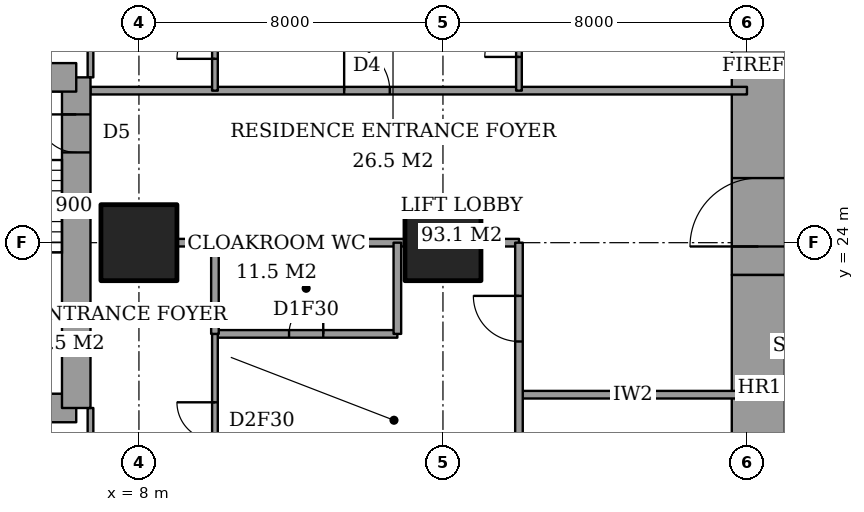
"""IFC4 building model, lengths in metres.
Left out: names, types, materials, properties, quantities, classifications, styles, units other than length and angle.
Written with IfcOpenShell. Run it as: python <this file> out.ifc"""

import sys

from ifc_helpers import new_model, si_unit, direction, frame, frame_2d, origin, origin_2d, place, context, subcontext, project, spatial, rectangle, extrude, element, fill, save


model = new_model("IFC4")
c1 = context("Model", 3, precision=1e-05, world=origin(), true_north=direction((0.0, 1.0)))
c2 = subcontext(c1, "Body", "Model", "MODEL_VIEW")
j1 = project(units=[si_unit("LENGTHUNIT", "METRE"), si_unit("PLANEANGLEUNIT", "RADIAN")], contexts=[c1])
p1 = place(None, origin())
s1 = spatial("IfcSite", under=j1, at=p1, CompositionType="ELEMENT")
p2 = place(p1, origin())
s2 = spatial("IfcBuilding", under=s1, at=p2, CompositionType="ELEMENT")
p3 = place(p2, frame((0.0, 0.0, 135.8)))
s3 = spatial("IfcBuildingStorey", under=s2, at=p3, CompositionType="ELEMENT", Elevation=135.8)
for number, where, z_axis, x_axis in (
    (1, (8.0, 24.0, 0.0), (0.0, 0.0, 1.0), (1.0, 0.0, 0.0)),
    (2, (16.0, 24.0, 0.0), (0.0, 0.0, 1.0), (1.0, 0.0, 0.0)),
):
    element("IfcColumn", number, at=place(p3, frame(where, z_axis=z_axis, x_axis=x_axis)), inside=s3, PredefinedType="COLUMN", context=c2, shape_type="SweptSolid", body=[
        extrude(rectangle(XDim=2.0, YDim=2.0, at=origin_2d()), origin(), (0.0, 0.0, 1.0), 3.6),
    ])
p4 = place(p3, frame((24.3, 13.0, 0.0), z_axis=(0.0, 0.0, 1.0), x_axis=(0.0, 1.0, 0.0)))
e3 = element("IfcWall", 3, at=p4, inside=s3, PredefinedType="SHEAR", context=c2, shape_type="SweptSolid", body=[
    extrude(rectangle(XDim=10.15, YDim=1.4, at=frame_2d((5.075, 0.0))), origin(), (0.0, 0.0, 1.0), 3.6),
])
p5 = place(p3, frame((24.3, 23.15, 0.0), z_axis=(0.0, 0.0, 1.0), x_axis=(0.0, 1.0, 0.0)))
e4 = element("IfcWall", 4, at=p5, inside=s3, PredefinedType="SHEAR", context=c2, shape_type="SweptSolid", body=[
    extrude(rectangle(XDim=11.85, YDim=1.4, at=frame_2d((5.925, 0.0))), origin(), (0.0, 0.0, 1.0), 3.6),
])
p6 = place(p5, frame((0.75, 0.0, 0.0)))
e5 = element("IfcOpeningElement", 5, at=p6, cuts=e4, PredefinedType="OPENING", context=c2, shape_type="SweptSolid", body=[
    extrude(rectangle(XDim=1.8, YDim=2.4, at=frame_2d((0.9, 1.2))), frame((0.0, 0.71, 0.0), z_axis=(0.0, -1.0, 0.0), x_axis=(1.0, 0.0, 0.0)), (0.0, 0.0, 1.0), 1.42),
])
p7 = place(p3, frame((1.9, 19.65, 0.0), z_axis=(0.0, 0.0, 1.0), x_axis=(1.0, 0.0, 0.0)))
e6 = element("IfcWall", 6, at=p7, inside=s3, PredefinedType="SHEAR", context=c2, shape_type="SweptSolid", body=[
    extrude(rectangle(XDim=4.45, YDim=0.75, at=frame_2d((2.225, 0.0))), origin(), (0.0, 0.0, 1.0), 3.6),
])
p8 = place(p3, frame((6.35, 19.65, 0.0), z_axis=(0.0, 0.0, 1.0), x_axis=(0.0, 1.0, 0.0)))
e7 = element("IfcWall", 7, at=p8, inside=s3, PredefinedType="SHEAR", context=c2, shape_type="SweptSolid", body=[
    extrude(rectangle(XDim=8.7, YDim=0.75, at=frame_2d((4.35, 0.0))), origin(), (0.0, 0.0, 1.0), 3.6),
])
p9 = place(p8, frame((6.725, 0.0, 0.0)))
e8 = element("IfcOpeningElement", 8, at=p9, cuts=e7, PredefinedType="OPENING", context=c2, shape_type="SweptSolid", body=[
    extrude(rectangle(XDim=1.0, YDim=2.1, at=frame_2d((0.5, 1.05))), frame((0.0, 0.385, 0.0), z_axis=(0.0, -1.0, 0.0), x_axis=(1.0, 0.0, 0.0)), (0.0, 0.0, 1.0), 0.77),
])
p10 = place(p3, frame((6.35, 28.35, 0.0), z_axis=(0.0, 0.0, 1.0), x_axis=(-1.0, 0.0, 0.0)))
e9 = element("IfcWall", 9, at=p10, inside=s3, PredefinedType="SHEAR", context=c2, shape_type="SweptSolid", body=[
    extrude(rectangle(XDim=4.45, YDim=0.75, at=frame_2d((2.225, 0.0))), origin(), (0.0, 0.0, 1.0), 3.6),
])
p11 = place(p3, frame((18.0, 20.0, 0.0), z_axis=(0.0, 0.0, 1.0), x_axis=(1.0, 0.0, 0.0)))
e10 = element("IfcWall", 10, at=p11, inside=s3, PredefinedType="PARTITIONING", context=c2, shape_type="SweptSolid", body=[
    extrude(rectangle(XDim=6.0, YDim=0.2, at=frame_2d((3.0, 0.0))), origin(), (0.0, 0.0, 1.0), 3.35),
])
p12 = place(p3, frame((10.0, 21.6, 0.0), z_axis=(0.0, 0.0, 1.0), x_axis=(1.0, 0.0, 0.0)))
e11 = element("IfcWall", 11, at=p12, inside=s3, PredefinedType="PARTITIONING", context=c2, shape_type="SweptSolid", body=[
    extrude(rectangle(XDim=4.8, YDim=0.2, at=frame_2d((2.4, 0.0))), origin(), (0.0, 0.0, 1.0), 3.35),
])
p13 = place(p12, frame((1.95, 0.0, 0.0)))
e12 = element("IfcOpeningElement", 12, at=p13, cuts=e11, PredefinedType="OPENING", context=c2, shape_type="SweptSolid", body=[
    extrude(rectangle(XDim=0.9, YDim=2.1, at=frame_2d((0.45, 1.05))), frame((0.0, 0.11, 0.0), z_axis=(0.0, -1.0, 0.0), x_axis=(1.0, 0.0, 0.0)), (0.0, 0.0, 1.0), 0.22),
])
p14 = place(p3, frame((9.0, 24.0, 0.0), z_axis=(0.0, 0.0, 1.0), x_axis=(1.0, 0.0, 0.0)))
e13 = element("IfcWall", 13, at=p14, inside=s3, PredefinedType="PARTITIONING", context=c2, shape_type="SweptSolid", body=[
    extrude(rectangle(XDim=6.0, YDim=0.2, at=frame_2d((3.0, 0.0))), origin(), (0.0, 0.0, 1.0), 3.35),
])
p15 = place(p3, frame((17.0, 24.0, 0.0), z_axis=(0.0, 0.0, 1.0), x_axis=(1.0, 0.0, 0.0)))
e14 = element("IfcWall", 14, at=p15, inside=s3, PredefinedType="PARTITIONING", context=c2, shape_type="SweptSolid", body=[
    extrude(rectangle(XDim=1.0, YDim=0.2, at=frame_2d((0.5, 0.0))), origin(), (0.0, 0.0, 1.0), 3.35),
])
p16 = place(p3, frame((6.725, 28.0, 0.0), z_axis=(0.0, 0.0, 1.0), x_axis=(1.0, 0.0, 0.0)))
e15 = element("IfcWall", 15, at=p16, inside=s3, PredefinedType="PARTITIONING", context=c2, shape_type="SweptSolid", body=[
    extrude(rectangle(XDim=17.275, YDim=0.2, at=frame_2d((8.637, 0.0))), origin(), (0.0, 0.0, 1.0), 3.35),
])
p17 = place(p16, frame((6.675, 0.0, 0.0)))
e16 = element("IfcOpeningElement", 16, at=p17, cuts=e15, PredefinedType="OPENING", context=c2, shape_type="SweptSolid", body=[
    extrude(rectangle(XDim=1.2, YDim=2.4, at=frame_2d((0.6, 1.2))), frame((0.0, 0.11, 0.0), z_axis=(0.0, -1.0, 0.0), x_axis=(1.0, 0.0, 0.0)), (0.0, 0.0, 1.0), 0.22),
])
p18 = place(p3, frame((6.725, 17.2, 0.0), z_axis=(0.0, 0.0, 1.0), x_axis=(0.0, 1.0, 0.0)))
e17 = element("IfcWall", 17, at=p18, inside=s3, PredefinedType="PARTITIONING", context=c2, shape_type="SweptSolid", body=[
    extrude(rectangle(XDim=2.45, YDim=0.15, at=frame_2d((1.225, 0.0))), origin(), (0.0, 0.0, 1.0), 3.35),
])
p19 = place(p18, frame((0.538, 0.0, 0.0)))
e18 = element("IfcOpeningElement", 18, at=p19, cuts=e17, PredefinedType="OPENING", context=c2, shape_type="SweptSolid", body=[
    extrude(rectangle(XDim=1.0, YDim=2.1, at=frame_2d((0.5, 1.05))), frame((0.0, 0.085, 0.0), z_axis=(0.0, -1.0, 0.0), x_axis=(1.0, 0.0, 0.0)), (0.0, 0.0, 1.0), 0.17),
])
p20 = place(p3, frame((6.725, 28.35, 0.0), z_axis=(0.0, 0.0, 1.0), x_axis=(0.0, 1.0, 0.0)))
e19 = element("IfcWall", 19, at=p20, inside=s3, PredefinedType="PARTITIONING", context=c2, shape_type="SweptSolid", body=[
    extrude(rectangle(XDim=2.45, YDim=0.15, at=frame_2d((1.225, 0.0))), origin(), (0.0, 0.0, 1.0), 3.35),
])
p21 = place(p20, frame((0.962, 0.0, 0.0)))
e20 = element("IfcOpeningElement", 20, at=p21, cuts=e19, PredefinedType="OPENING", context=c2, shape_type="SweptSolid", body=[
    extrude(rectangle(XDim=0.9, YDim=2.1, at=frame_2d((0.45, 1.05))), frame((0.0, 0.085, 0.0), z_axis=(0.0, -1.0, 0.0), x_axis=(1.0, 0.0, 0.0)), (0.0, 0.0, 1.0), 0.17),
])
p22 = place(p3, frame((10.0, 21.6, 0.0), z_axis=(0.0, 0.0, 1.0), x_axis=(0.0, 1.0, 0.0)))
e21 = element("IfcWall", 21, at=p22, inside=s3, PredefinedType="PARTITIONING", context=c2, shape_type="SweptSolid", body=[
    extrude(rectangle(XDim=2.4, YDim=0.2, at=frame_2d((1.2, 0.0))), origin(), (0.0, 0.0, 1.0), 3.35),
])
p23 = place(p3, frame((10.0, 10.6, 0.0), z_axis=(0.0, 0.0, 1.0), x_axis=(0.0, 1.0, 0.0)))
e22 = element("IfcWall", 22, at=p23, inside=s3, PredefinedType="PARTITIONING", context=c2, shape_type="SweptSolid", body=[
    extrude(rectangle(XDim=11.0, YDim=0.15, at=frame_2d((5.5, 0.0))), origin(), (0.0, 0.0, 1.0), 3.35),
])
p24 = place(p23, frame((8.2, 0.0, 0.0)))
e23 = element("IfcOpeningElement", 23, at=p24, cuts=e22, PredefinedType="OPENING", context=c2, shape_type="SweptSolid", body=[
    extrude(rectangle(XDim=1.0, YDim=2.1, at=frame_2d((0.5, 1.05))), frame((0.0, 0.085, 0.0), z_axis=(0.0, -1.0, 0.0), x_axis=(1.0, 0.0, 0.0)), (0.0, 0.0, 1.0), 0.17),
])
p25 = place(p3, frame((10.0, 28.0, 0.0), z_axis=(0.0, 0.0, 1.0), x_axis=(0.0, 1.0, 0.0)))
e24 = element("IfcWall", 24, at=p25, inside=s3, PredefinedType="PARTITIONING", context=c2, shape_type="SweptSolid", body=[
    extrude(rectangle(XDim=3.0, YDim=0.15, at=frame_2d((1.5, 0.0))), origin(), (0.0, 0.0, 1.0), 3.35),
])
p26 = place(p25, frame((0.837, 0.0, 0.0)))
e25 = element("IfcOpeningElement", 25, at=p26, cuts=e24, PredefinedType="OPENING", context=c2, shape_type="SweptSolid", body=[
    extrude(rectangle(XDim=1.0, YDim=2.1, at=frame_2d((0.5, 1.05))), frame((0.0, 0.085, 0.0), z_axis=(0.0, -1.0, 0.0), x_axis=(1.0, 0.0, 0.0)), (0.0, 0.0, 1.0), 0.17),
])
p27 = place(p3, frame((14.8, 21.6, 0.0), z_axis=(0.0, 0.0, 1.0), x_axis=(0.0, 1.0, 0.0)))
e26 = element("IfcWall", 26, at=p27, inside=s3, PredefinedType="PARTITIONING", context=c2, shape_type="SweptSolid", body=[
    extrude(rectangle(XDim=2.4, YDim=0.2, at=frame_2d((1.2, 0.0))), origin(), (0.0, 0.0, 1.0), 3.35),
])
p28 = place(p3, frame((18.0, 17.0, 0.0), z_axis=(0.0, 0.0, 1.0), x_axis=(0.0, 1.0, 0.0)))
e27 = element("IfcWall", 27, at=p28, inside=s3, PredefinedType="PARTITIONING", context=c2, shape_type="SweptSolid", body=[
    extrude(rectangle(XDim=7.0, YDim=0.2, at=frame_2d((3.5, 0.0))), origin(), (0.0, 0.0, 1.0), 3.35),
])
p29 = place(p28, frame((4.4, 0.0, 0.0)))
e28 = element("IfcOpeningElement", 28, at=p29, cuts=e27, PredefinedType="OPENING", context=c2, shape_type="SweptSolid", body=[
    extrude(rectangle(XDim=1.2, YDim=2.4, at=frame_2d((0.6, 1.2))), frame((0.0, 0.11, 0.0), z_axis=(0.0, -1.0, 0.0), x_axis=(1.0, 0.0, 0.0)), (0.0, 0.0, 1.0), 0.22),
])
p30 = place(p28, frame((1.05, 0.0, 0.0)))
e29 = element("IfcOpeningElement", 29, at=p30, cuts=e27, PredefinedType="OPENING", context=c2, shape_type="SweptSolid", body=[
    extrude(rectangle(XDim=0.9, YDim=2.1, at=frame_2d((0.45, 1.05))), frame((0.0, 0.11, 0.0), z_axis=(0.0, -1.0, 0.0), x_axis=(1.0, 0.0, 0.0)), (0.0, 0.0, 1.0), 0.22),
])
p31 = place(p3, frame((18.0, 28.0, 0.0), z_axis=(0.0, 0.0, 1.0), x_axis=(0.0, 1.0, 0.0)))
e30 = element("IfcWall", 30, at=p31, inside=s3, PredefinedType="PARTITIONING", context=c2, shape_type="SweptSolid", body=[
    extrude(rectangle(XDim=9.4, YDim=0.15, at=frame_2d((4.7, 0.0))), origin(), (0.0, 0.0, 1.0), 3.35),
])
p32 = place(p31, frame((0.887, 0.0, 0.0)))
e31 = element("IfcOpeningElement", 31, at=p32, cuts=e30, PredefinedType="OPENING", context=c2, shape_type="SweptSolid", body=[
    extrude(rectangle(XDim=0.9, YDim=2.1, at=frame_2d((0.45, 1.05))), frame((0.0, 0.085, 0.0), z_axis=(0.0, -1.0, 0.0), x_axis=(1.0, 0.0, 0.0)), (0.0, 0.0, 1.0), 0.17),
])
p33 = place(p24, origin())
e32 = element("IfcDoor", 32, at=p33, inside=s3, OperationType="SINGLE_SWING_LEFT", PredefinedType="DOOR", context=c2, shape_type="SweptSolid", body=[
    extrude(rectangle(XDim=1.0, YDim=2.1, at=frame_2d((0.5, 1.05))), frame((0.0, 0.025, 0.0), z_axis=(0.0, -1.0, 0.0), x_axis=(1.0, 0.0, 0.0)), (0.0, 0.0, 1.0), 0.05),
])
fill(e23, e32)
p34 = place(p13, origin())
e33 = element("IfcDoor", 33, at=p34, inside=s3, OperationType="SINGLE_SWING_LEFT", PredefinedType="DOOR", context=c2, shape_type="SweptSolid", body=[
    extrude(rectangle(XDim=0.9, YDim=2.1, at=frame_2d((0.45, 1.05))), frame((0.0, 0.025, 0.0), z_axis=(0.0, -1.0, 0.0), x_axis=(1.0, 0.0, 0.0)), (0.0, 0.0, 1.0), 0.05),
])
fill(e12, e33)
p35 = place(p29, origin())
e34 = element("IfcDoor", 34, at=p35, inside=s3, OperationType="SINGLE_SWING_LEFT", PredefinedType="DOOR", context=c2, shape_type="SweptSolid", body=[
    extrude(rectangle(XDim=1.2, YDim=2.4, at=frame_2d((0.6, 1.2))), frame((0.0, 0.025, 0.0), z_axis=(0.0, -1.0, 0.0), x_axis=(1.0, 0.0, 0.0)), (0.0, 0.0, 1.0), 0.05),
])
fill(e28, e34)
p36 = place(p26, origin())
e35 = element("IfcDoor", 35, at=p36, inside=s3, OperationType="SINGLE_SWING_RIGHT", PredefinedType="DOOR", context=c2, shape_type="SweptSolid", body=[
    extrude(rectangle(XDim=1.0, YDim=2.1, at=frame_2d((0.5, 1.05))), frame((0.0, 0.025, 0.0), z_axis=(0.0, -1.0, 0.0), x_axis=(1.0, 0.0, 0.0)), (0.0, 0.0, 1.0), 0.05),
])
fill(e25, e35)
p37 = place(p17, origin())
e36 = element("IfcDoor", 36, at=p37, inside=s3, OperationType="SINGLE_SWING_RIGHT", PredefinedType="DOOR", context=c2, shape_type="SweptSolid", body=[
    extrude(rectangle(XDim=1.2, YDim=2.4, at=frame_2d((0.6, 1.2))), frame((0.0, 0.025, 0.0), z_axis=(0.0, -1.0, 0.0), x_axis=(1.0, 0.0, 0.0)), (0.0, 0.0, 1.0), 0.05),
])
fill(e16, e36)
p38 = place(p32, origin())
e37 = element("IfcDoor", 37, at=p38, inside=s3, OperationType="SINGLE_SWING_RIGHT", PredefinedType="DOOR", context=c2, shape_type="SweptSolid", body=[
    extrude(rectangle(XDim=0.9, YDim=2.1, at=frame_2d((0.45, 1.05))), frame((0.0, 0.025, 0.0), z_axis=(0.0, -1.0, 0.0), x_axis=(1.0, 0.0, 0.0)), (0.0, 0.0, 1.0), 0.05),
])
fill(e31, e37)
p39 = place(p6, origin())
e38 = element("IfcDoor", 38, at=p39, inside=s3, OperationType="DOUBLE_DOOR_DOUBLE_SWING", PredefinedType="DOOR", context=c2, shape_type="SweptSolid", body=[
    extrude(rectangle(XDim=1.8, YDim=2.4, at=frame_2d((0.9, 1.2))), frame((0.0, 0.025, 0.0), z_axis=(0.0, -1.0, 0.0), x_axis=(1.0, 0.0, 0.0)), (0.0, 0.0, 1.0), 0.05),
])
fill(e5, e38)
p40 = place(p9, origin())
e39 = element("IfcDoor", 39, at=p40, inside=s3, OperationType="SINGLE_SWING_LEFT", PredefinedType="DOOR", context=c2, shape_type="SweptSolid", body=[
    extrude(rectangle(XDim=1.0, YDim=2.1, at=frame_2d((0.5, 1.05))), frame((0.0, 0.025, 0.0), z_axis=(0.0, -1.0, 0.0), x_axis=(1.0, 0.0, 0.0)), (0.0, 0.0, 1.0), 0.05),
])
fill(e8, e39)
save(model, sys.argv[1])
